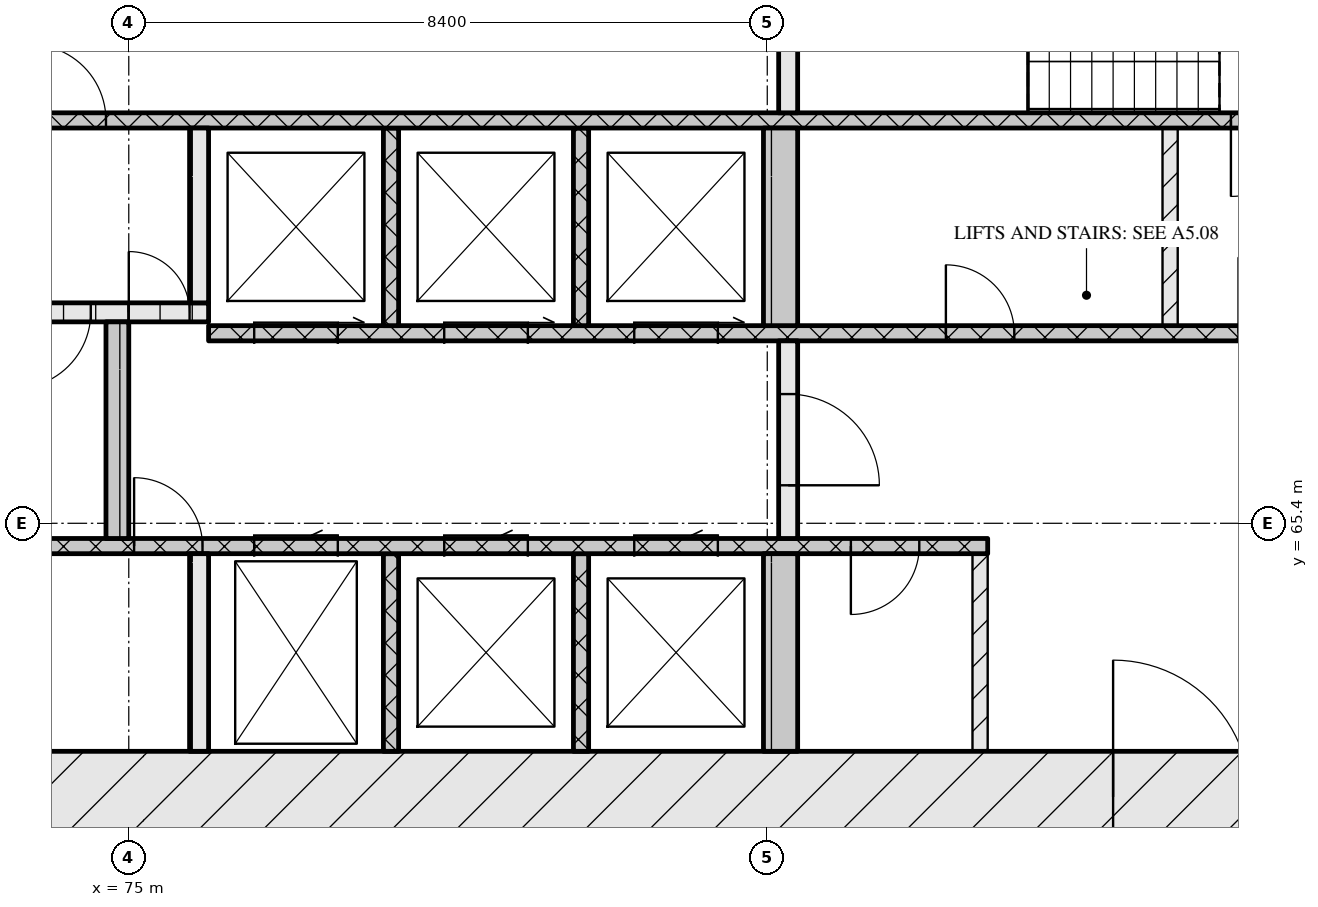
"""IFC4 building model, lengths in metres.
Left out: names, types, materials, properties, quantities, classifications, styles, units other than length and angle.
Written with IfcOpenShell. Run it as: python <this file> out.ifc"""

import sys

from ifc_helpers import new_model, si_unit, direction, frame, frame_2d, origin, place, context, subcontext, project, spatial, rectangle, extrude, element, fill, save


model = new_model("IFC4")
c1 = context("Model", 3, precision=1e-05, world=origin(), true_north=direction((0.0, 1.0)))
c2 = subcontext(c1, "Body", "Model", "MODEL_VIEW")
j1 = project(units=[si_unit("LENGTHUNIT", "METRE"), si_unit("PLANEANGLEUNIT", "RADIAN")], contexts=[c1])
p1 = place(None, origin())
s1 = spatial("IfcSite", under=j1, at=p1, CompositionType="ELEMENT")
p2 = place(p1, origin())
s2 = spatial("IfcBuilding", under=s1, at=p2, CompositionType="ELEMENT")
p3 = place(p2, frame((0.0, 0.0, 55.2)))
s3 = spatial("IfcBuildingStorey", under=s2, at=p3, CompositionType="ELEMENT", Elevation=55.2)
p4 = place(p3, frame((66.6, 61.8, 0.0), z_axis=(0.0, 0.0, 1.0), x_axis=(1.0, 0.0, 0.0)))
e1 = element("IfcWall", 1, at=p4, inside=s3, PredefinedType="SOLIDWALL", context=c2, shape_type="SweptSolid", body=[
    extrude(rectangle(XDim=42.0, YDim=1.2, at=frame_2d((21.0, 0.0))), origin(), (0.0, 0.0, 1.0), 3.32),
])
p5 = place(p4, frame((21.35, 0.0, 0.0)))
e2 = element("IfcOpeningElement", 2, at=p5, cuts=e1, PredefinedType="OPENING", context=c2, shape_type="SweptSolid", body=[
    extrude(rectangle(XDim=1.8, YDim=2.1, at=frame_2d((0.9, 1.05))), frame((0.0, 0.61, 0.0), z_axis=(0.0, -1.0, 0.0), x_axis=(1.0, 0.0, 0.0)), (0.0, 0.0, 1.0), 1.22),
])
p6 = place(p3, frame((75.925, 62.4, 0.0), z_axis=(0.0, 0.0, 1.0), x_axis=(0.0, 1.0, 0.0)))
e3 = element("IfcWall", 3, at=p6, inside=s3, PredefinedType="SOLIDWALL", context=c2, shape_type="SweptSolid", body=[
    extrude(rectangle(XDim=2.6, YDim=0.25, at=frame_2d((1.3, 0.0))), origin(), (0.0, 0.0, 1.0), 3.32),
])
for number, where, z_axis, x_axis in (
    (4, (78.45, 62.4, 0.0), (0.0, 0.0, 1.0), (0.0, 1.0, 0.0)),
    (5, (80.95, 62.4, 0.0), (0.0, 0.0, 1.0), (0.0, 1.0, 0.0)),
):
    element("IfcWall", number, at=place(p3, frame(where, z_axis=z_axis, x_axis=x_axis)), inside=s3, PredefinedType="SOLIDWALL", context=c2, shape_type="SweptSolid", body=[
        extrude(rectangle(XDim=2.6, YDim=0.2, at=frame_2d((1.3, 0.0))), origin(), (0.0, 0.0, 1.0), 3.32),
    ])
p7 = place(p3, frame((83.575, 62.4, 0.0), z_axis=(0.0, 0.0, 1.0), x_axis=(0.0, 1.0, 0.0)))
e6 = element("IfcWall", 6, at=p7, inside=s3, PredefinedType="SOLIDWALL", context=c2, shape_type="SweptSolid", body=[
    extrude(rectangle(XDim=2.6, YDim=0.45, at=frame_2d((1.3, 0.0))), origin(), (0.0, 0.0, 1.0), 3.32),
])
p8 = place(p3, frame((86.2, 62.4, 0.0), z_axis=(0.0, 0.0, 1.0), x_axis=(0.0, 1.0, 0.0)))
e7 = element("IfcWall", 7, at=p8, inside=s3, PredefinedType="PARTITIONING", context=c2, shape_type="SweptSolid", body=[
    extrude(rectangle(XDim=2.6, YDim=0.2, at=frame_2d((1.3, 0.0))), origin(), (0.0, 0.0, 1.0), 3.32),
])
p9 = place(p3, frame((67.8, 65.1, 0.0), z_axis=(0.0, 0.0, 1.0), x_axis=(1.0, 0.0, 0.0)))
e8 = element("IfcWall", 8, at=p9, inside=s3, PredefinedType="SOLIDWALL", context=c2, shape_type="SweptSolid", body=[
    extrude(rectangle(XDim=18.5, YDim=0.2, at=frame_2d((9.25, 0.0))), origin(), (0.0, 0.0, 1.0), 3.32),
])
p10 = place(p9, frame((7.27, 0.0, 0.0)))
e9 = element("IfcOpeningElement", 9, at=p10, cuts=e8, PredefinedType="OPENING", context=c2, shape_type="SweptSolid", body=[
    extrude(rectangle(XDim=0.9, YDim=2.1, at=frame_2d((0.45, 1.05))), frame((0.0, 0.11, 0.0), z_axis=(0.0, -1.0, 0.0), x_axis=(1.0, 0.0, 0.0)), (0.0, 0.0, 1.0), 0.22),
])
p11 = place(p9, frame((8.85, 0.0, 0.0)))
e10 = element("IfcOpeningElement", 10, at=p11, cuts=e8, PredefinedType="OPENING", context=c2, shape_type="SweptSolid", body=[
    extrude(rectangle(XDim=1.1, YDim=2.1, at=frame_2d((0.55, 1.05))), frame((0.0, 0.11, 0.0), z_axis=(0.0, -1.0, 0.0), x_axis=(1.0, 0.0, 0.0)), (0.0, 0.0, 1.0), 0.22),
])
p12 = place(p9, frame((11.35, 0.0, 0.0)))
e11 = element("IfcOpeningElement", 11, at=p12, cuts=e8, PredefinedType="OPENING", context=c2, shape_type="SweptSolid", body=[
    extrude(rectangle(XDim=1.1, YDim=2.1, at=frame_2d((0.55, 1.05))), frame((0.0, 0.11, 0.0), z_axis=(0.0, -1.0, 0.0), x_axis=(1.0, 0.0, 0.0)), (0.0, 0.0, 1.0), 0.22),
])
p13 = place(p9, frame((13.85, 0.0, 0.0)))
e12 = element("IfcOpeningElement", 12, at=p13, cuts=e8, PredefinedType="OPENING", context=c2, shape_type="SweptSolid", body=[
    extrude(rectangle(XDim=1.1, YDim=2.1, at=frame_2d((0.55, 1.05))), frame((0.0, 0.11, 0.0), z_axis=(0.0, -1.0, 0.0), x_axis=(1.0, 0.0, 0.0)), (0.0, 0.0, 1.0), 0.22),
])
p14 = place(p9, frame((16.7, 0.0, 0.0)))
e13 = element("IfcOpeningElement", 13, at=p14, cuts=e8, PredefinedType="OPENING", context=c2, shape_type="SweptSolid", body=[
    extrude(rectangle(XDim=0.9, YDim=2.1, at=frame_2d((0.45, 1.05))), frame((0.0, 0.11, 0.0), z_axis=(0.0, -1.0, 0.0), x_axis=(1.0, 0.0, 0.0)), (0.0, 0.0, 1.0), 0.22),
])
p15 = place(p3, frame((74.85, 65.2, 0.0), z_axis=(0.0, 0.0, 1.0), x_axis=(0.0, 1.0, 0.0)))
e14 = element("IfcWall", 14, at=p15, inside=s3, PredefinedType="SOLIDWALL", context=c2, shape_type="SweptSolid", body=[
    extrude(rectangle(XDim=2.85, YDim=0.3, at=frame_2d((1.425, 0.0))), origin(), (0.0, 0.0, 1.0), 3.32),
])
p16 = place(p3, frame((83.675, 65.2, 0.0), z_axis=(0.0, 0.0, 1.0), x_axis=(0.0, 1.0, 0.0)))
e15 = element("IfcWall", 15, at=p16, inside=s3, PredefinedType="SOLIDWALL", context=c2, shape_type="SweptSolid", body=[
    extrude(rectangle(XDim=2.6, YDim=0.25, at=frame_2d((1.3, 0.0))), origin(), (0.0, 0.0, 1.0), 3.32),
])
p17 = place(p16, frame((0.7, 0.0, 0.0)))
e16 = element("IfcOpeningElement", 16, at=p17, cuts=e15, PredefinedType="OPENING", context=c2, shape_type="SweptSolid", body=[
    extrude(rectangle(XDim=1.2, YDim=2.1, at=frame_2d((0.6, 1.05))), frame((0.0, 0.135, 0.0), z_axis=(0.0, -1.0, 0.0), x_axis=(1.0, 0.0, 0.0)), (0.0, 0.0, 1.0), 0.27),
])
p18 = place(p3, frame((76.05, 67.9, 0.0), z_axis=(0.0, 0.0, 1.0), x_axis=(1.0, 0.0, 0.0)))
e17 = element("IfcWall", 17, at=p18, inside=s3, PredefinedType="SOLIDWALL", context=c2, shape_type="SweptSolid", body=[
    extrude(rectangle(XDim=23.1, YDim=0.2, at=frame_2d((11.55, 0.0))), origin(), (0.0, 0.0, 1.0), 3.32),
])
p19 = place(p18, frame((0.6, 0.0, 0.0)))
e18 = element("IfcOpeningElement", 18, at=p19, cuts=e17, PredefinedType="OPENING", context=c2, shape_type="SweptSolid", body=[
    extrude(rectangle(XDim=1.1, YDim=2.1, at=frame_2d((0.55, 1.05))), frame((0.0, 0.11, 0.0), z_axis=(0.0, -1.0, 0.0), x_axis=(1.0, 0.0, 0.0)), (0.0, 0.0, 1.0), 0.22),
])
p20 = place(p18, frame((3.1, 0.0, 0.0)))
e19 = element("IfcOpeningElement", 19, at=p20, cuts=e17, PredefinedType="OPENING", context=c2, shape_type="SweptSolid", body=[
    extrude(rectangle(XDim=1.1, YDim=2.1, at=frame_2d((0.55, 1.05))), frame((0.0, 0.11, 0.0), z_axis=(0.0, -1.0, 0.0), x_axis=(1.0, 0.0, 0.0)), (0.0, 0.0, 1.0), 0.22),
])
p21 = place(p18, frame((5.6, 0.0, 0.0)))
e20 = element("IfcOpeningElement", 20, at=p21, cuts=e17, PredefinedType="OPENING", context=c2, shape_type="SweptSolid", body=[
    extrude(rectangle(XDim=1.1, YDim=2.1, at=frame_2d((0.55, 1.05))), frame((0.0, 0.11, 0.0), z_axis=(0.0, -1.0, 0.0), x_axis=(1.0, 0.0, 0.0)), (0.0, 0.0, 1.0), 0.22),
])
p22 = place(p18, frame((9.7, 0.0, 0.0)))
e21 = element("IfcOpeningElement", 21, at=p22, cuts=e17, PredefinedType="OPENING", context=c2, shape_type="SweptSolid", body=[
    extrude(rectangle(XDim=0.9, YDim=2.1, at=frame_2d((0.45, 1.05))), frame((0.0, 0.11, 0.0), z_axis=(0.0, -1.0, 0.0), x_axis=(1.0, 0.0, 0.0)), (0.0, 0.0, 1.0), 0.22),
])
p23 = place(p18, frame((13.55, 0.0, 0.0)))
e22 = element("IfcOpeningElement", 22, at=p23, cuts=e17, PredefinedType="OPENING", context=c2, shape_type="SweptSolid", body=[
    extrude(rectangle(XDim=1.0, YDim=2.1, at=frame_2d((0.5, 1.05))), frame((0.0, 0.11, 0.0), z_axis=(0.0, -1.0, 0.0), x_axis=(1.0, 0.0, 0.0)), (0.0, 0.0, 1.0), 0.22),
])
for number, where, z_axis, x_axis in (
    (23, (78.45, 68.0, 0.0), (0.0, 0.0, 1.0), (0.0, 1.0, 0.0)),
    (24, (80.95, 68.0, 0.0), (0.0, 0.0, 1.0), (0.0, 1.0, 0.0)),
):
    element("IfcWall", number, at=place(p3, frame(where, z_axis=z_axis, x_axis=x_axis)), inside=s3, PredefinedType="SOLIDWALL", context=c2, shape_type="SweptSolid", body=[
        extrude(rectangle(XDim=2.6, YDim=0.2, at=frame_2d((1.3, 0.0))), origin(), (0.0, 0.0, 1.0), 3.32),
    ])
p24 = place(p3, frame((83.575, 68.0, 0.0), z_axis=(0.0, 0.0, 1.0), x_axis=(0.0, 1.0, 0.0)))
e25 = element("IfcWall", 25, at=p24, inside=s3, PredefinedType="SOLIDWALL", context=c2, shape_type="SweptSolid", body=[
    extrude(rectangle(XDim=2.6, YDim=0.45, at=frame_2d((1.3, 0.0))), origin(), (0.0, 0.0, 1.0), 3.32),
])
p25 = place(p3, frame((88.7, 68.0, 0.0), z_axis=(0.0, 0.0, 1.0), x_axis=(0.0, 1.0, 0.0)))
e26 = element("IfcWall", 26, at=p25, inside=s3, PredefinedType="PARTITIONING", context=c2, shape_type="SweptSolid", body=[
    extrude(rectangle(XDim=2.6, YDim=0.2, at=frame_2d((1.3, 0.0))), origin(), (0.0, 0.0, 1.0), 3.32),
])
p26 = place(p3, frame((67.8, 68.175, 0.0), z_axis=(0.0, 0.0, 1.0), x_axis=(1.0, 0.0, 0.0)))
e27 = element("IfcWall", 27, at=p26, inside=s3, PredefinedType="SOLIDWALL", context=c2, shape_type="SweptSolid", body=[
    extrude(rectangle(XDim=8.25, YDim=0.25, at=frame_2d((4.125, 0.0))), origin(), (0.0, 0.0, 1.0), 3.32),
])
p27 = place(p26, frame((5.7, 0.0, 0.0)))
e28 = element("IfcOpeningElement", 28, at=p27, cuts=e27, PredefinedType="OPENING", context=c2, shape_type="SweptSolid", body=[
    extrude(rectangle(XDim=1.0, YDim=2.1, at=frame_2d((0.5, 1.05))), frame((0.0, 0.135, 0.0), z_axis=(0.0, -1.0, 0.0), x_axis=(1.0, 0.0, 0.0)), (0.0, 0.0, 1.0), 0.27),
])
p28 = place(p26, frame((7.2, 0.0, 0.0)))
e29 = element("IfcOpeningElement", 29, at=p28, cuts=e27, PredefinedType="OPENING", context=c2, shape_type="SweptSolid", body=[
    extrude(rectangle(XDim=0.8, YDim=2.1, at=frame_2d((0.4, 1.05))), frame((0.0, 0.135, 0.0), z_axis=(0.0, -1.0, 0.0), x_axis=(1.0, 0.0, 0.0)), (0.0, 0.0, 1.0), 0.27),
])
p29 = place(p3, frame((75.925, 68.3, 0.0), z_axis=(0.0, 0.0, 1.0), x_axis=(0.0, 1.0, 0.0)))
e30 = element("IfcWall", 30, at=p29, inside=s3, PredefinedType="SOLIDWALL", context=c2, shape_type="SweptSolid", body=[
    extrude(rectangle(XDim=2.3, YDim=0.25, at=frame_2d((1.15, 0.0))), origin(), (0.0, 0.0, 1.0), 3.32),
])
p30 = place(p3, frame((67.8, 70.7, 0.0), z_axis=(0.0, 0.0, 1.0), x_axis=(1.0, 0.0, 0.0)))
e31 = element("IfcWall", 31, at=p30, inside=s3, PredefinedType="SOLIDWALL", context=c2, shape_type="SweptSolid", body=[
    extrude(rectangle(XDim=39.6, YDim=0.2, at=frame_2d((19.8, 0.0))), origin(), (0.0, 0.0, 1.0), 3.32),
])
p31 = place(p30, frame((0.65, 0.0, 0.0)))
e32 = element("IfcOpeningElement", 32, at=p31, cuts=e31, PredefinedType="OPENING", context=c2, shape_type="SweptSolid", body=[
    extrude(rectangle(XDim=1.1, YDim=2.1, at=frame_2d((0.55, 1.05))), frame((0.0, 0.11, 0.0), z_axis=(0.0, -1.0, 0.0), x_axis=(1.0, 0.0, 0.0)), (0.0, 0.0, 1.0), 0.22),
])
p32 = place(p30, frame((3.25, 0.0, 0.0)))
e33 = element("IfcOpeningElement", 33, at=p32, cuts=e31, PredefinedType="OPENING", context=c2, shape_type="SweptSolid", body=[
    extrude(rectangle(XDim=1.1, YDim=2.1, at=frame_2d((0.55, 1.05))), frame((0.0, 0.11, 0.0), z_axis=(0.0, -1.0, 0.0), x_axis=(1.0, 0.0, 0.0)), (0.0, 0.0, 1.0), 0.22),
])
p33 = place(p30, frame((5.9, 0.0, 0.0)))
e34 = element("IfcOpeningElement", 34, at=p33, cuts=e31, PredefinedType="OPENING", context=c2, shape_type="SweptSolid", body=[
    extrude(rectangle(XDim=1.0, YDim=2.1, at=frame_2d((0.5, 1.05))), frame((0.0, 0.11, 0.0), z_axis=(0.0, -1.0, 0.0), x_axis=(1.0, 0.0, 0.0)), (0.0, 0.0, 1.0), 0.22),
])
p34 = place(p30, frame((21.7, 0.0, 0.0)))
e35 = element("IfcOpeningElement", 35, at=p34, cuts=e31, PredefinedType="OPENING", context=c2, shape_type="SweptSolid", body=[
    extrude(rectangle(XDim=1.0, YDim=2.1, at=frame_2d((0.5, 1.05))), frame((0.0, 0.11, 0.0), z_axis=(0.0, -1.0, 0.0), x_axis=(1.0, 0.0, 0.0)), (0.0, 0.0, 1.0), 0.22),
])
p35 = place(p30, frame((32.7, 0.0, 0.0)))
e36 = element("IfcOpeningElement", 36, at=p35, cuts=e31, PredefinedType="OPENING", context=c2, shape_type="SweptSolid", body=[
    extrude(rectangle(XDim=1.0, YDim=2.1, at=frame_2d((0.5, 1.05))), frame((0.0, 0.11, 0.0), z_axis=(0.0, -1.0, 0.0), x_axis=(1.0, 0.0, 0.0)), (0.0, 0.0, 1.0), 0.22),
])
p36 = place(p30, frame((35.25, 0.0, 0.0)))
e37 = element("IfcOpeningElement", 37, at=p36, cuts=e31, PredefinedType="OPENING", context=c2, shape_type="SweptSolid", body=[
    extrude(rectangle(XDim=1.1, YDim=2.1, at=frame_2d((0.55, 1.05))), frame((0.0, 0.11, 0.0), z_axis=(0.0, -1.0, 0.0), x_axis=(1.0, 0.0, 0.0)), (0.0, 0.0, 1.0), 0.22),
])
p37 = place(p30, frame((37.85, 0.0, 0.0)))
e38 = element("IfcOpeningElement", 38, at=p37, cuts=e31, PredefinedType="OPENING", context=c2, shape_type="SweptSolid", body=[
    extrude(rectangle(XDim=1.1, YDim=2.1, at=frame_2d((0.55, 1.05))), frame((0.0, 0.11, 0.0), z_axis=(0.0, -1.0, 0.0), x_axis=(1.0, 0.0, 0.0)), (0.0, 0.0, 1.0), 0.22),
])
p38 = place(p3, frame((83.675, 70.8, 0.0), z_axis=(0.0, 0.0, 1.0), x_axis=(0.0, 1.0, 0.0)))
e39 = element("IfcWall", 39, at=p38, inside=s3, PredefinedType="SOLIDWALL", context=c2, shape_type="SweptSolid", body=[
    extrude(rectangle(XDim=1.2, YDim=0.25, at=frame_2d((0.6, 0.0))), origin(), (0.0, 0.0, 1.0), 3.32),
])
p39 = place(p5, origin())
e40 = element("IfcDoor", 40, at=p39, inside=s3, OperationType="DOUBLE_DOOR_SINGLE_SWING", PredefinedType="DOOR", context=c2, shape_type="SweptSolid", body=[
    extrude(rectangle(XDim=1.8, YDim=2.1, at=frame_2d((0.9, 1.05))), frame((0.0, 0.025, 0.0), z_axis=(0.0, -1.0, 0.0), x_axis=(1.0, 0.0, 0.0)), (0.0, 0.0, 1.0), 0.05),
])
fill(e2, e40)
p40 = place(p10, origin())
e41 = element("IfcDoor", 41, at=p40, inside=s3, OperationType="SINGLE_SWING_LEFT", PredefinedType="DOOR", context=c2, shape_type="SweptSolid", body=[
    extrude(rectangle(XDim=0.9, YDim=2.1, at=frame_2d((0.45, 1.05))), frame((0.0, 0.025, 0.0), z_axis=(0.0, -1.0, 0.0), x_axis=(1.0, 0.0, 0.0)), (0.0, 0.0, 1.0), 0.05),
])
fill(e9, e41)
p41 = place(p11, origin())
e42 = element("IfcDoor", 42, at=p41, inside=s3, OperationType="SLIDING_TO_LEFT", PredefinedType="DOOR", context=c2, shape_type="SweptSolid", body=[
    extrude(rectangle(XDim=1.1, YDim=2.1, at=frame_2d((0.55, 1.05))), frame((0.0, 0.025, 0.0), z_axis=(0.0, -1.0, 0.0), x_axis=(1.0, 0.0, 0.0)), (0.0, 0.0, 1.0), 0.05),
])
fill(e10, e42)
p42 = place(p12, origin())
e43 = element("IfcDoor", 43, at=p42, inside=s3, OperationType="SLIDING_TO_LEFT", PredefinedType="DOOR", context=c2, shape_type="SweptSolid", body=[
    extrude(rectangle(XDim=1.1, YDim=2.1, at=frame_2d((0.55, 1.05))), frame((0.0, 0.025, 0.0), z_axis=(0.0, -1.0, 0.0), x_axis=(1.0, 0.0, 0.0)), (0.0, 0.0, 1.0), 0.05),
])
fill(e11, e43)
p43 = place(p13, origin())
e44 = element("IfcDoor", 44, at=p43, inside=s3, OperationType="SLIDING_TO_LEFT", PredefinedType="DOOR", context=c2, shape_type="SweptSolid", body=[
    extrude(rectangle(XDim=1.1, YDim=2.1, at=frame_2d((0.55, 1.05))), frame((0.0, 0.025, 0.0), z_axis=(0.0, -1.0, 0.0), x_axis=(1.0, 0.0, 0.0)), (0.0, 0.0, 1.0), 0.05),
])
fill(e12, e44)
p44 = place(p14, origin())
e45 = element("IfcDoor", 45, at=p44, inside=s3, OperationType="SINGLE_SWING_RIGHT", PredefinedType="DOOR", context=c2, shape_type="SweptSolid", body=[
    extrude(rectangle(XDim=0.9, YDim=2.1, at=frame_2d((0.45, 1.05))), frame((0.0, 0.025, 0.0), z_axis=(0.0, -1.0, 0.0), x_axis=(1.0, 0.0, 0.0)), (0.0, 0.0, 1.0), 0.05),
])
fill(e13, e45)
p45 = place(p17, origin())
e46 = element("IfcDoor", 46, at=p45, inside=s3, OperationType="SINGLE_SWING_RIGHT", PredefinedType="DOOR", context=c2, shape_type="SweptSolid", body=[
    extrude(rectangle(XDim=1.2, YDim=2.1, at=frame_2d((0.6, 1.05))), frame((0.0, 0.025, 0.0), z_axis=(0.0, -1.0, 0.0), x_axis=(1.0, 0.0, 0.0)), (0.0, 0.0, 1.0), 0.05),
])
fill(e16, e46)
p46 = place(p19, origin())
e47 = element("IfcDoor", 47, at=p46, inside=s3, OperationType="SLIDING_TO_RIGHT", PredefinedType="DOOR", context=c2, shape_type="SweptSolid", body=[
    extrude(rectangle(XDim=1.1, YDim=2.1, at=frame_2d((0.55, 1.05))), frame((0.0, 0.025, 0.0), z_axis=(0.0, -1.0, 0.0), x_axis=(1.0, 0.0, 0.0)), (0.0, 0.0, 1.0), 0.05),
])
fill(e18, e47)
p47 = place(p20, origin())
e48 = element("IfcDoor", 48, at=p47, inside=s3, OperationType="SLIDING_TO_RIGHT", PredefinedType="DOOR", context=c2, shape_type="SweptSolid", body=[
    extrude(rectangle(XDim=1.1, YDim=2.1, at=frame_2d((0.55, 1.05))), frame((0.0, 0.025, 0.0), z_axis=(0.0, -1.0, 0.0), x_axis=(1.0, 0.0, 0.0)), (0.0, 0.0, 1.0), 0.05),
])
fill(e19, e48)
p48 = place(p21, origin())
e49 = element("IfcDoor", 49, at=p48, inside=s3, OperationType="SLIDING_TO_RIGHT", PredefinedType="DOOR", context=c2, shape_type="SweptSolid", body=[
    extrude(rectangle(XDim=1.1, YDim=2.1, at=frame_2d((0.55, 1.05))), frame((0.0, 0.025, 0.0), z_axis=(0.0, -1.0, 0.0), x_axis=(1.0, 0.0, 0.0)), (0.0, 0.0, 1.0), 0.05),
])
fill(e20, e49)
p49 = place(p22, origin())
e50 = element("IfcDoor", 50, at=p49, inside=s3, OperationType="SINGLE_SWING_LEFT", PredefinedType="DOOR", context=c2, shape_type="SweptSolid", body=[
    extrude(rectangle(XDim=0.9, YDim=2.1, at=frame_2d((0.45, 1.05))), frame((0.0, 0.025, 0.0), z_axis=(0.0, -1.0, 0.0), x_axis=(1.0, 0.0, 0.0)), (0.0, 0.0, 1.0), 0.05),
])
fill(e21, e50)
p50 = place(p27, origin())
e51 = element("IfcDoor", 51, at=p50, inside=s3, OperationType="SINGLE_SWING_RIGHT", PredefinedType="DOOR", context=c2, shape_type="SweptSolid", body=[
    extrude(rectangle(XDim=1.0, YDim=2.1, at=frame_2d((0.5, 1.05))), frame((0.0, 0.025, 0.0), z_axis=(0.0, -1.0, 0.0), x_axis=(1.0, 0.0, 0.0)), (0.0, 0.0, 1.0), 0.05),
])
fill(e28, e51)
p51 = place(p28, origin())
e52 = element("IfcDoor", 52, at=p51, inside=s3, OperationType="SINGLE_SWING_LEFT", PredefinedType="DOOR", context=c2, shape_type="SweptSolid", body=[
    extrude(rectangle(XDim=0.8, YDim=2.1, at=frame_2d((0.4, 1.05))), frame((0.0, 0.025, 0.0), z_axis=(0.0, -1.0, 0.0), x_axis=(1.0, 0.0, 0.0)), (0.0, 0.0, 1.0), 0.05),
])
fill(e29, e52)
p52 = place(p33, origin())
e53 = element("IfcDoor", 53, at=p52, inside=s3, OperationType="SINGLE_SWING_LEFT", PredefinedType="DOOR", context=c2, shape_type="SweptSolid", body=[
    extrude(rectangle(XDim=1.0, YDim=2.1, at=frame_2d((0.5, 1.05))), frame((0.0, 0.025, 0.0), z_axis=(0.0, -1.0, 0.0), x_axis=(1.0, 0.0, 0.0)), (0.0, 0.0, 1.0), 0.05),
])
fill(e34, e53)
p53 = place(p34, origin())
e54 = element("IfcDoor", 54, at=p53, inside=s3, OperationType="SINGLE_SWING_RIGHT", PredefinedType="DOOR", context=c2, shape_type="SweptSolid", body=[
    extrude(rectangle(XDim=1.0, YDim=2.1, at=frame_2d((0.5, 1.05))), frame((0.0, 0.025, 0.0), z_axis=(0.0, -1.0, 0.0), x_axis=(1.0, 0.0, 0.0)), (0.0, 0.0, 1.0), 0.05),
])
fill(e35, e54)
save(model, sys.argv[1])
